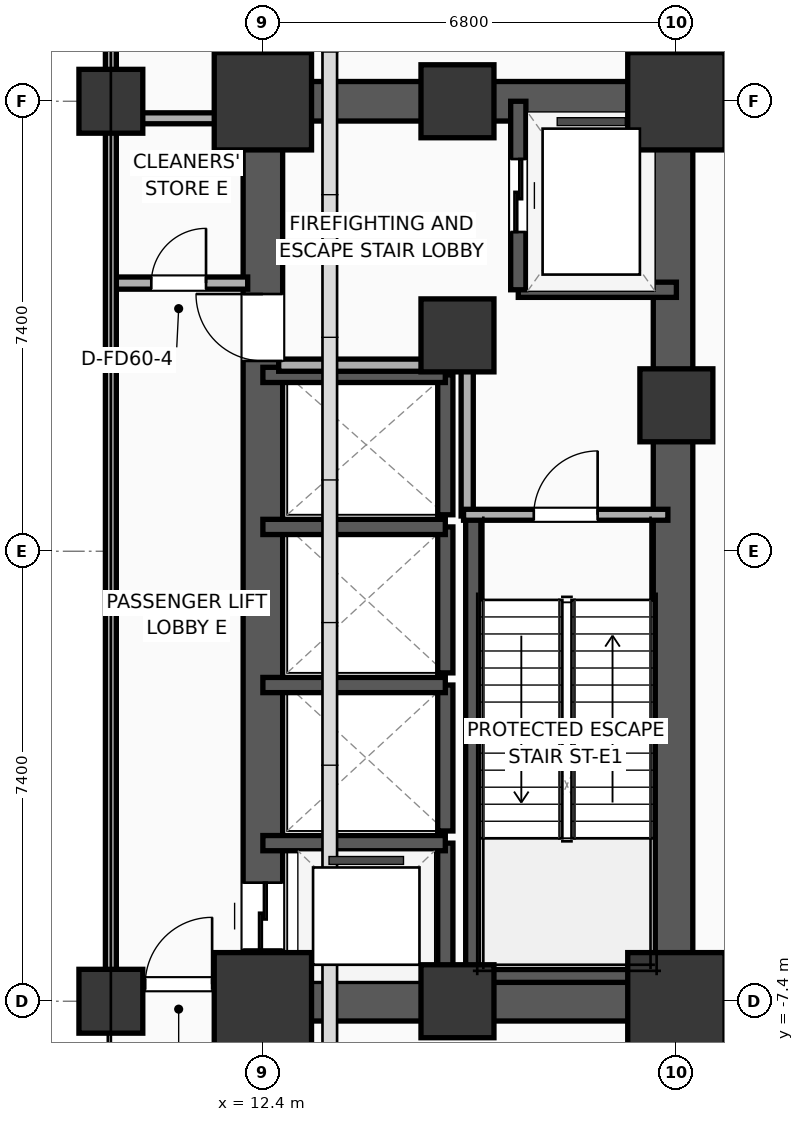
"""IFC4 building model, lengths in metres.
Left out: names, types, materials, properties, quantities, classifications, styles, units other than length and angle.
Written with IfcOpenShell. Run it as: python <this file> out.ifc"""

import sys

from ifc_helpers import new_model, si_unit, direction, frame, frame_2d, origin, origin_2d, place, context, subcontext, project, spatial, rectangle, extrude, element, fill, save


model = new_model("IFC4")
c1 = context("Model", 3, precision=1e-05, world=origin(), true_north=direction((0.0, 1.0)))
c2 = subcontext(c1, "Body", "Model", "MODEL_VIEW")
j1 = project(units=[si_unit("LENGTHUNIT", "METRE"), si_unit("PLANEANGLEUNIT", "RADIAN")], contexts=[c1])
p1 = place(None, origin())
s1 = spatial("IfcSite", under=j1, at=p1, CompositionType="ELEMENT")
p2 = place(p1, origin())
s2 = spatial("IfcBuilding", under=s1, at=p2, CompositionType="ELEMENT")
p3 = place(p2, frame((0.0, 0.0, 15.6)))
s3 = spatial("IfcBuildingStorey", under=s2, at=p3, CompositionType="ELEMENT", Elevation=15.6)
p4 = place(p3, frame((12.4, -7.4, 0.0), z_axis=(0.0, 0.0, 1.0), x_axis=(1.0, 0.0, 0.0)))
e1 = element("IfcColumn", 1, at=p4, inside=s3, PredefinedType="COLUMN", context=c2, shape_type="SweptSolid", body=[
    extrude(rectangle(XDim=1.6, YDim=1.6, at=origin_2d()), origin(), (0.0, 0.0, 1.0), 5.2),
])
p5 = place(p3, frame((15.6, 3.55, 0.0), z_axis=(0.0, 0.0, 1.0), x_axis=(1.0, 0.0, 0.0)))
e2 = element("IfcColumn", 2, at=p5, inside=s3, PredefinedType="COLUMN", context=c2, shape_type="SweptSolid", body=[
    extrude(rectangle(XDim=1.2, YDim=1.2, at=origin_2d()), origin(), (0.0, 0.0, 1.0), 5.2),
])
p6 = place(p3, frame((12.4, 7.4, 0.0), z_axis=(0.0, 0.0, 1.0), x_axis=(1.0, 0.0, 0.0)))
e3 = element("IfcColumn", 3, at=p6, inside=s3, PredefinedType="COLUMN", context=c2, shape_type="SweptSolid", body=[
    extrude(rectangle(XDim=1.6, YDim=1.6, at=origin_2d()), origin(), (0.0, 0.0, 1.0), 5.2),
])
for number, where, z_axis, x_axis in (
    (4, (15.6, -7.4, 0.0), (0.0, 0.0, 1.0), (1.0, 0.0, 0.0)),
    (5, (15.6, 7.4, 0.0), (0.0, 0.0, 1.0), (1.0, 0.0, 0.0)),
):
    element("IfcColumn", number, at=place(p3, frame(where, z_axis=z_axis, x_axis=x_axis)), inside=s3, PredefinedType="COLUMN", context=c2, shape_type="SweptSolid", body=[
        extrude(rectangle(XDim=1.2, YDim=1.2, at=origin_2d()), origin(), (0.0, 0.0, 1.0), 5.2),
    ])
p7 = place(p3, frame((19.2, -7.4, 0.0), z_axis=(0.0, 0.0, 1.0), x_axis=(1.0, 0.0, 0.0)))
e6 = element("IfcColumn", 6, at=p7, inside=s3, PredefinedType="COLUMN", context=c2, shape_type="SweptSolid", body=[
    extrude(rectangle(XDim=1.6, YDim=1.6, at=origin_2d()), origin(), (0.0, 0.0, 1.0), 5.2),
])
p8 = place(p3, frame((19.2, 2.4, 0.0), z_axis=(0.0, 0.0, 1.0), x_axis=(1.0, 0.0, 0.0)))
e7 = element("IfcColumn", 7, at=p8, inside=s3, PredefinedType="COLUMN", context=c2, shape_type="SweptSolid", body=[
    extrude(rectangle(XDim=1.2, YDim=1.2, at=origin_2d()), origin(), (0.0, 0.0, 1.0), 5.2),
])
p9 = place(p3, frame((19.2, 7.4, 0.0), z_axis=(0.0, 0.0, 1.0), x_axis=(1.0, 0.0, 0.0)))
e8 = element("IfcColumn", 8, at=p9, inside=s3, PredefinedType="COLUMN", context=c2, shape_type="SweptSolid", body=[
    extrude(rectangle(XDim=1.6, YDim=1.6, at=origin_2d()), origin(), (0.0, 0.0, 1.0), 5.2),
])
for number, where, z_axis, x_axis in (
    (9, (12.075, -7.4, 0.0), (0.0, 0.0, 1.0), (1.0, 0.0, 0.0)),
    (10, (12.075, 7.4, 0.0), (0.0, 0.0, 1.0), (1.0, 0.0, 0.0)),
):
    element("IfcWall", number, at=place(p3, frame(where, z_axis=z_axis, x_axis=x_axis)), inside=s3, PredefinedType="SHEAR", context=c2, shape_type="SweptSolid", body=[
        extrude(rectangle(XDim=7.45, YDim=0.65, at=frame_2d((3.725, 0.0))), origin(), (0.0, 0.0, 1.0), 4.8),
    ])
p10 = place(p3, frame((12.4, -7.4, 0.0), z_axis=(0.0, 0.0, 1.0), x_axis=(0.0, 1.0, 0.0)))
e11 = element("IfcWall", 11, at=p10, inside=s3, PredefinedType="SHEAR", context=c2, shape_type="SweptSolid", body=[
    extrude(rectangle(XDim=14.8, YDim=0.65, at=frame_2d((7.4, 0.0))), origin(), (0.0, 0.0, 1.0), 4.8),
])
p11 = place(p10, frame((0.85, 0.0, 0.0)))
e12 = element("IfcOpeningElement", 12, at=p11, cuts=e11, PredefinedType="OPENING", context=c2, shape_type="SweptSolid", body=[
    extrude(rectangle(XDim=1.1, YDim=2.05, at=frame_2d((0.55, 1.025))), frame((0.0, 0.335, 0.0), z_axis=(0.0, -1.0, 0.0), x_axis=(1.0, 0.0, 0.0)), (0.0, 0.0, 1.0), 0.67),
])
p12 = place(p10, frame((10.53, 0.0, 0.0)))
e13 = element("IfcOpeningElement", 13, at=p12, cuts=e11, PredefinedType="OPENING", context=c2, shape_type="SweptSolid", body=[
    extrude(rectangle(XDim=1.1, YDim=2.05, at=frame_2d((0.55, 1.025))), frame((0.0, 0.335, 0.0), z_axis=(0.0, -1.0, 0.0), x_axis=(1.0, 0.0, 0.0)), (0.0, 0.0, 1.0), 0.67),
])
p13 = place(p3, frame((19.145, -7.4, 0.0), z_axis=(0.0, 0.0, 1.0), x_axis=(0.0, 1.0, 0.0)))
e14 = element("IfcWall", 14, at=p13, inside=s3, PredefinedType="SHEAR", context=c2, shape_type="SweptSolid", body=[
    extrude(rectangle(XDim=14.8, YDim=0.65, at=frame_2d((7.4, 0.0))), origin(), (0.0, 0.0, 1.0), 4.8),
])
p14 = place(p3, frame((15.86, -7.085, 0.0), z_axis=(0.0, 0.0, 1.0), x_axis=(0.0, 1.0, 0.0)))
e15 = element("IfcWall", 15, at=p14, inside=s3, PredefinedType="SOLIDWALL", context=c2, shape_type="SweptSolid", body=[
    extrude(rectangle(XDim=7.685, YDim=0.25, at=frame_2d((3.843, 0.0))), origin(), (0.0, 0.0, 1.0), 4.8),
])
p15 = place(p3, frame((15.74, -6.965, 0.0), z_axis=(0.0, 0.0, 1.0), x_axis=(1.0, 0.0, 0.0)))
e16 = element("IfcWall", 16, at=p15, inside=s3, PredefinedType="SOLIDWALL", context=c2, shape_type="SweptSolid", body=[
    extrude(rectangle(XDim=3.46, YDim=0.25, at=frame_2d((1.73, 0.0))), origin(), (0.0, 0.0, 1.0), 4.8),
])
for number, where, z_axis, x_axis in (
    (17, (9.9, -7.4, 0.0), (0.0, 0.0, 1.0), (1.0, 0.0, 0.0)),
    (18, (9.9, 7.4, 0.0), (0.0, 0.0, 1.0), (1.0, 0.0, 0.0)),
):
    element("IfcColumn", number, at=place(p3, frame(where, z_axis=z_axis, x_axis=x_axis)), inside=s3, PredefinedType="COLUMN", context=c2, shape_type="SweptSolid", body=[
        extrude(rectangle(XDim=1.05, YDim=1.05, at=origin_2d()), origin(), (0.0, 0.0, 1.0), 5.2),
    ])
p16 = place(p3, frame((16.6, 4.3, 0.0), z_axis=(0.0, 0.0, 1.0), x_axis=(1.0, 0.0, 0.0)))
e19 = element("IfcWall", 19, at=p16, inside=s3, PredefinedType="SOLIDWALL", context=c2, shape_type="SweptSolid", body=[
    extrude(rectangle(XDim=2.6, YDim=0.25, at=frame_2d((1.3, 0.0))), origin(), (0.0, 0.0, 1.0), 4.8),
])
p17 = place(p3, frame((16.6, 7.4, 0.0), z_axis=(0.0, 0.0, 1.0), x_axis=(0.0, -1.0, 0.0)))
e20 = element("IfcWall", 20, at=p17, inside=s3, PredefinedType="SOLIDWALL", context=c2, shape_type="SweptSolid", body=[
    extrude(rectangle(XDim=3.1, YDim=0.25, at=frame_2d((1.55, 0.0))), origin(), (0.0, 0.0, 1.0), 4.8),
])
p18 = place(p17, frame((0.95, 0.0, 0.0)))
e21 = element("IfcOpeningElement", 21, at=p18, cuts=e20, PredefinedType="OPENING", context=c2, shape_type="SweptSolid", body=[
    extrude(rectangle(XDim=1.2, YDim=2.05, at=frame_2d((0.6, 1.025))), frame((0.0, 0.135, 0.0), z_axis=(0.0, -1.0, 0.0), x_axis=(1.0, 0.0, 0.0)), (0.0, 0.0, 1.0), 0.27),
])
p19 = place(p3, frame((15.4, -7.4, 0.0), z_axis=(0.0, 0.0, 1.0), x_axis=(0.0, 1.0, 0.0)))
e22 = element("IfcWall", 22, at=p19, inside=s3, PredefinedType="SOLIDWALL", context=c2, shape_type="SweptSolid", body=[
    extrude(rectangle(XDim=2.6, YDim=0.25, at=frame_2d((1.3, 0.0))), origin(), (0.0, 0.0, 1.0), 4.8),
])
p20 = place(p3, frame((15.4, -4.8, 0.0), z_axis=(0.0, 0.0, 1.0), x_axis=(-1.0, 0.0, 0.0)))
e23 = element("IfcWall", 23, at=p20, inside=s3, PredefinedType="SOLIDWALL", context=c2, shape_type="SweptSolid", body=[
    extrude(rectangle(XDim=3.0, YDim=0.25, at=frame_2d((1.5, 0.0))), origin(), (0.0, 0.0, 1.0), 4.8),
])
p21 = place(p3, frame((15.4, -4.6, 0.0), z_axis=(0.0, 0.0, 1.0), x_axis=(0.0, 1.0, 0.0)))
e24 = element("IfcWall", 24, at=p21, inside=s3, PredefinedType="SOLIDWALL", context=c2, shape_type="SweptSolid", body=[
    extrude(rectangle(XDim=2.4, YDim=0.25, at=frame_2d((1.2, 0.0))), origin(), (0.0, 0.0, 1.0), 4.8),
])
p22 = place(p3, frame((15.4, -2.2, 0.0), z_axis=(0.0, 0.0, 1.0), x_axis=(-1.0, 0.0, 0.0)))
e25 = element("IfcWall", 25, at=p22, inside=s3, PredefinedType="SOLIDWALL", context=c2, shape_type="SweptSolid", body=[
    extrude(rectangle(XDim=3.0, YDim=0.25, at=frame_2d((1.5, 0.0))), origin(), (0.0, 0.0, 1.0), 4.8),
])
p23 = place(p3, frame((15.4, -2.0, 0.0), z_axis=(0.0, 0.0, 1.0), x_axis=(0.0, 1.0, 0.0)))
e26 = element("IfcWall", 26, at=p23, inside=s3, PredefinedType="SOLIDWALL", context=c2, shape_type="SweptSolid", body=[
    extrude(rectangle(XDim=2.4, YDim=0.25, at=frame_2d((1.2, 0.0))), origin(), (0.0, 0.0, 1.0), 4.8),
])
p24 = place(p3, frame((15.4, 0.4, 0.0), z_axis=(0.0, 0.0, 1.0), x_axis=(-1.0, 0.0, 0.0)))
e27 = element("IfcWall", 27, at=p24, inside=s3, PredefinedType="SOLIDWALL", context=c2, shape_type="SweptSolid", body=[
    extrude(rectangle(XDim=3.0, YDim=0.25, at=frame_2d((1.5, 0.0))), origin(), (0.0, 0.0, 1.0), 4.8),
])
p25 = place(p3, frame((15.4, 0.6, 0.0), z_axis=(0.0, 0.0, 1.0), x_axis=(0.0, 1.0, 0.0)))
e28 = element("IfcWall", 28, at=p25, inside=s3, PredefinedType="SOLIDWALL", context=c2, shape_type="SweptSolid", body=[
    extrude(rectangle(XDim=2.3, YDim=0.25, at=frame_2d((1.15, 0.0))), origin(), (0.0, 0.0, 1.0), 4.8),
])
p26 = place(p3, frame((15.4, 2.9, 0.0), z_axis=(0.0, 0.0, 1.0), x_axis=(-1.0, 0.0, 0.0)))
e29 = element("IfcWall", 29, at=p26, inside=s3, PredefinedType="SOLIDWALL", context=c2, shape_type="SweptSolid", body=[
    extrude(rectangle(XDim=3.0, YDim=0.25, at=frame_2d((1.5, 0.0))), origin(), (0.0, 0.0, 1.0), 4.8),
])
p27 = place(p3, frame((15.76, 0.58, 0.0), z_axis=(0.0, 0.0, 1.0), x_axis=(0.0, 1.0, 0.0)))
e30 = element("IfcWall", 30, at=p27, inside=s3, PredefinedType="PARTITIONING", context=c2, shape_type="SweptSolid", body=[
    extrude(rectangle(XDim=2.52, YDim=0.2, at=frame_2d((1.26, 0.0))), origin(), (0.0, 0.0, 1.0), 4.8),
])
p28 = place(p3, frame((12.66, 3.06, 0.0), z_axis=(0.0, 0.0, 1.0), x_axis=(1.0, 0.0, 0.0)))
e31 = element("IfcWall", 31, at=p28, inside=s3, PredefinedType="PARTITIONING", context=c2, shape_type="SweptSolid", body=[
    extrude(rectangle(XDim=3.16, YDim=0.2, at=frame_2d((1.58, 0.0))), origin(), (0.0, 0.0, 1.0), 4.8),
])
p29 = place(p3, frame((15.7, 0.6, 0.0), z_axis=(0.0, 0.0, 1.0), x_axis=(1.0, 0.0, 0.0)))
e32 = element("IfcWall", 32, at=p29, inside=s3, PredefinedType="PARTITIONING", context=c2, shape_type="SweptSolid", body=[
    extrude(rectangle(XDim=3.36, YDim=0.18, at=frame_2d((1.68, 0.0))), origin(), (0.0, 0.0, 1.0), 4.8),
])
p30 = place(p29, frame((1.155, 0.0, 0.0)))
e33 = element("IfcOpeningElement", 33, at=p30, cuts=e32, PredefinedType="OPENING", context=c2, shape_type="SweptSolid", body=[
    extrude(rectangle(XDim=1.05, YDim=2.05, at=frame_2d((0.525, 1.025))), frame((0.0, 0.1, 0.0), z_axis=(0.0, -1.0, 0.0), x_axis=(1.0, 0.0, 0.0)), (0.0, 0.0, 1.0), 0.2),
])
p31 = place(p3, frame((9.88, 4.41, 0.0), z_axis=(0.0, 0.0, 1.0), x_axis=(1.0, 0.0, 0.0)))
e34 = element("IfcWall", 34, at=p31, inside=s3, PredefinedType="PARTITIONING", context=c2, shape_type="SweptSolid", body=[
    extrude(rectangle(XDim=2.27, YDim=0.2, at=frame_2d((1.135, 0.0))), origin(), (0.0, 0.0, 1.0), 4.8),
])
p32 = place(p31, frame((0.685, 0.0, 0.0)))
e35 = element("IfcOpeningElement", 35, at=p32, cuts=e34, PredefinedType="OPENING", context=c2, shape_type="SweptSolid", body=[
    extrude(rectangle(XDim=0.9, YDim=2.05, at=frame_2d((0.45, 1.025))), frame((0.0, 0.11, 0.0), z_axis=(0.0, -1.0, 0.0), x_axis=(1.0, 0.0, 0.0)), (0.0, 0.0, 1.0), 0.22),
])
p33 = place(p3, frame((9.88, 7.12, 0.0), z_axis=(0.0, 0.0, 1.0), x_axis=(1.0, 0.0, 0.0)))
e36 = element("IfcWall", 36, at=p33, inside=s3, PredefinedType="PARTITIONING", context=c2, shape_type="SweptSolid", body=[
    extrude(rectangle(XDim=2.27, YDim=0.18, at=frame_2d((1.135, 0.0))), origin(), (0.0, 0.0, 1.0), 4.09),
])
p34 = place(p3, frame((9.88, -7.12, 0.0), z_axis=(0.0, 0.0, 1.0), x_axis=(1.0, 0.0, 0.0)))
e37 = element("IfcWall", 37, at=p34, inside=s3, PredefinedType="PARTITIONING", context=c2, shape_type="SweptSolid", body=[
    extrude(rectangle(XDim=2.27, YDim=0.18, at=frame_2d((1.135, 0.0))), origin(), (0.0, 0.0, 1.0), 4.09),
])
p35 = place(p34, frame((0.585, 0.0, 0.0)))
e38 = element("IfcOpeningElement", 38, at=p35, cuts=e37, PredefinedType="OPENING", context=c2, shape_type="SweptSolid", body=[
    extrude(rectangle(XDim=1.1, YDim=2.05, at=frame_2d((0.55, 1.025))), frame((0.0, 0.1, 0.0), z_axis=(0.0, -1.0, 0.0), x_axis=(1.0, 0.0, 0.0)), (0.0, 0.0, 1.0), 0.2),
])
p36 = place(p3, frame((9.9, -7.12, 0.0), z_axis=(0.0, 0.0, 1.0), x_axis=(0.0, 1.0, 0.0)))
e39 = element("IfcWall", 39, at=p36, inside=s3, PredefinedType="PARTITIONING", context=c2, shape_type="SweptSolid", body=[
    extrude(rectangle(XDim=16.82, YDim=0.18, at=frame_2d((8.41, 0.0))), origin(), (0.0, 0.0, 1.0), 4.09),
])
p37 = place(p18, origin())
e40 = element("IfcDoor", 40, at=p37, inside=s3, OperationType="SLIDING_TO_LEFT", PredefinedType="DOOR", context=c2, shape_type="SweptSolid", body=[
    extrude(rectangle(XDim=1.2, YDim=2.05, at=frame_2d((0.6, 1.025))), frame((0.0, 0.025, 0.0), z_axis=(0.0, -1.0, 0.0), x_axis=(1.0, 0.0, 0.0)), (0.0, 0.0, 1.0), 0.05),
])
fill(e21, e40)
p38 = place(p11, origin())
e41 = element("IfcDoor", 41, at=p38, inside=s3, OperationType="SLIDING_TO_LEFT", PredefinedType="DOOR", context=c2, shape_type="SweptSolid", body=[
    extrude(rectangle(XDim=1.1, YDim=2.05, at=frame_2d((0.55, 1.025))), frame((0.0, 0.025, 0.0), z_axis=(0.0, -1.0, 0.0), x_axis=(1.0, 0.0, 0.0)), (0.0, 0.0, 1.0), 0.05),
])
fill(e12, e41)
p39 = place(p30, origin())
e42 = element("IfcDoor", 42, at=p39, inside=s3, OperationType="SINGLE_SWING_RIGHT", PredefinedType="DOOR", context=c2, shape_type="SweptSolid", body=[
    extrude(rectangle(XDim=1.05, YDim=2.05, at=frame_2d((0.525, 1.025))), frame((0.0, 0.025, 0.0), z_axis=(0.0, -1.0, 0.0), x_axis=(1.0, 0.0, 0.0)), (0.0, 0.0, 1.0), 0.05),
])
fill(e33, e42)
p40 = place(p32, origin())
e43 = element("IfcDoor", 43, at=p40, inside=s3, OperationType="SINGLE_SWING_RIGHT", PredefinedType="DOOR", context=c2, shape_type="SweptSolid", body=[
    extrude(rectangle(XDim=0.9, YDim=2.05, at=frame_2d((0.45, 1.025))), frame((0.0, 0.025, 0.0), z_axis=(0.0, -1.0, 0.0), x_axis=(1.0, 0.0, 0.0)), (0.0, 0.0, 1.0), 0.05),
])
fill(e35, e43)
p41 = place(p35, origin())
e44 = element("IfcDoor", 44, at=p41, inside=s3, OperationType="SINGLE_SWING_RIGHT", PredefinedType="DOOR", context=c2, shape_type="SweptSolid", body=[
    extrude(rectangle(XDim=1.1, YDim=2.05, at=frame_2d((0.55, 1.025))), frame((0.0, 0.025, 0.0), z_axis=(0.0, -1.0, 0.0), x_axis=(1.0, 0.0, 0.0)), (0.0, 0.0, 1.0), 0.05),
])
fill(e38, e44)
p42 = place(p12, origin())
e45 = element("IfcDoor", 45, at=p42, inside=s3, OperationType="SINGLE_SWING_RIGHT", PredefinedType="DOOR", context=c2, shape_type="SweptSolid", body=[
    extrude(rectangle(XDim=1.1, YDim=2.05, at=frame_2d((0.55, 1.025))), frame((0.0, 0.025, 0.0), z_axis=(0.0, -1.0, 0.0), x_axis=(1.0, 0.0, 0.0)), (0.0, 0.0, 1.0), 0.05),
])
fill(e13, e45)
save(model, sys.argv[1])
